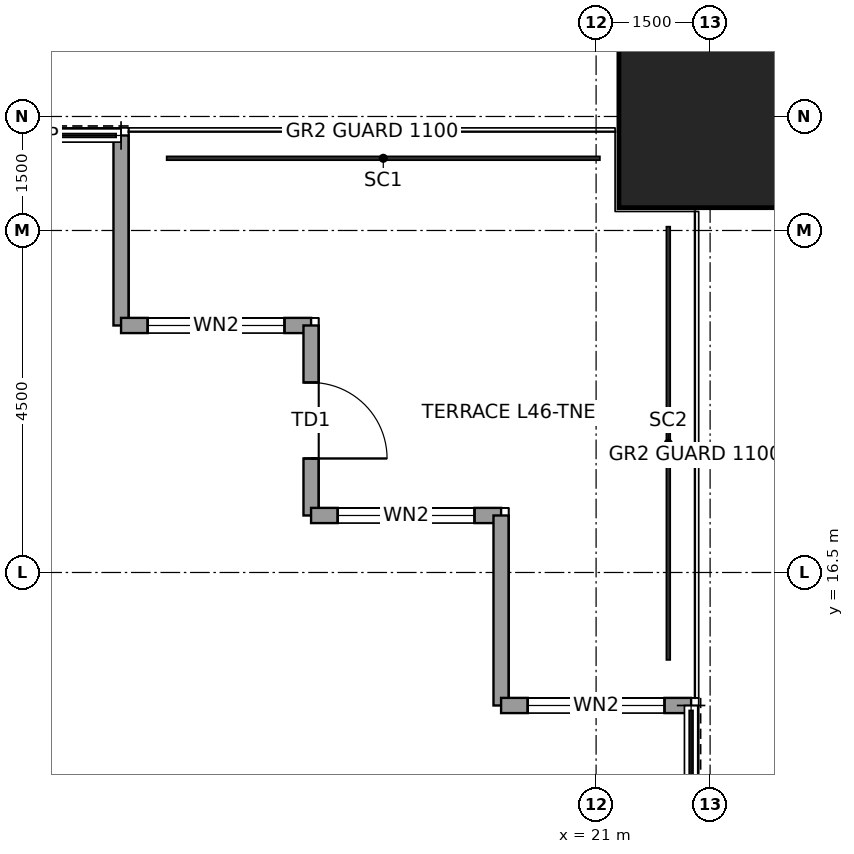
"""IFC4 building model, lengths in metres.
Left out: names, types, materials, properties, quantities, classifications, styles, units other than length and angle.
Written with IfcOpenShell. Run it as: python <this file> out.ifc"""

import sys

from ifc_helpers import new_model, si_unit, direction, frame, frame_2d, origin, origin_2d, place, context, subcontext, project, spatial, rectangle, hollow_rectangle, extrude, element, fill, save


model = new_model("IFC4")
c1 = context("Model", 3, precision=1e-05, world=origin(), true_north=direction((0.0, 1.0)))
c2 = subcontext(c1, "Body", "Model", "MODEL_VIEW")
j1 = project(units=[si_unit("LENGTHUNIT", "METRE"), si_unit("PLANEANGLEUNIT", "RADIAN")], contexts=[c1])
p1 = place(None, origin())
s1 = spatial("IfcSite", under=j1, at=p1, CompositionType="ELEMENT")
p2 = place(p1, origin())
s2 = spatial("IfcBuilding", under=s1, at=p2, CompositionType="ELEMENT")
p3 = place(p2, frame((0.0, 0.0, 217.9)))
s3 = spatial("IfcBuildingStorey", under=s2, at=p3, CompositionType="ELEMENT", Elevation=217.9)
p4 = place(p3, frame((22.5, 22.5, 0.0), z_axis=(0.0, 0.0, 1.0), x_axis=(1.0, 0.0, 0.0)))
e1 = element("IfcColumn", 1, at=p4, inside=s3, PredefinedType="COLUMN", context=c2, shape_type="SweptSolid", body=[
    extrude(hollow_rectangle(XDim=2.4, YDim=2.4, WallThickness=0.12, at=origin_2d()), origin(), (0.0, 0.0, 1.0), 4.0),
])
p5 = place(p3, frame((14.75, 22.25, 0.0), z_axis=(0.0, 0.0, 1.0), x_axis=(0.0, -1.0, 0.0)))
e2 = element("IfcWall", 2, at=p5, inside=s3, PredefinedType="SOLIDWALL", context=c2, shape_type="SweptSolid", body=[
    extrude(rectangle(XDim=2.5, YDim=0.2, at=frame_2d((1.25, 0.0))), origin(), (0.0, 0.0, 1.0), 3.85),
])
p6 = place(p3, frame((14.75, 19.75, 0.0), z_axis=(0.0, 0.0, 1.0), x_axis=(1.0, 0.0, 0.0)))
e3 = element("IfcWall", 3, at=p6, inside=s3, PredefinedType="SOLIDWALL", context=c2, shape_type="SweptSolid", body=[
    extrude(rectangle(XDim=2.5, YDim=0.2, at=frame_2d((1.25, 0.0))), origin(), (0.0, 0.0, 1.0), 3.85),
])
p7 = place(p6, frame((0.35, 0.0, 0.3)))
e4 = element("IfcOpeningElement", 4, at=p7, cuts=e3, PredefinedType="OPENING", context=c2, shape_type="SweptSolid", body=[
    extrude(rectangle(XDim=1.8, YDim=2.4, at=frame_2d((0.9, 1.2))), frame((0.0, 0.11, 0.0), z_axis=(0.0, -1.0, 0.0), x_axis=(1.0, 0.0, 0.0)), (0.0, 0.0, 1.0), 0.22),
])
p8 = place(p3, frame((17.25, 19.75, 0.0), z_axis=(0.0, 0.0, 1.0), x_axis=(0.0, -1.0, 0.0)))
e5 = element("IfcWall", 5, at=p8, inside=s3, PredefinedType="SOLIDWALL", context=c2, shape_type="SweptSolid", body=[
    extrude(rectangle(XDim=2.5, YDim=0.2, at=frame_2d((1.25, 0.0))), origin(), (0.0, 0.0, 1.0), 3.85),
])
p9 = place(p8, frame((0.75, 0.0, 0.0)))
e6 = element("IfcOpeningElement", 6, at=p9, cuts=e5, PredefinedType="OPENING", context=c2, shape_type="SweptSolid", body=[
    extrude(rectangle(XDim=1.0, YDim=2.4, at=frame_2d((0.5, 1.2))), frame((0.0, 0.11, 0.0), z_axis=(0.0, -1.0, 0.0), x_axis=(1.0, 0.0, 0.0)), (0.0, 0.0, 1.0), 0.22),
])
p10 = place(p3, frame((17.25, 17.25, 0.0), z_axis=(0.0, 0.0, 1.0), x_axis=(1.0, 0.0, 0.0)))
e7 = element("IfcWall", 7, at=p10, inside=s3, PredefinedType="SOLIDWALL", context=c2, shape_type="SweptSolid", body=[
    extrude(rectangle(XDim=2.5, YDim=0.2, at=frame_2d((1.25, 0.0))), origin(), (0.0, 0.0, 1.0), 3.85),
])
p11 = place(p10, frame((0.35, 0.0, 0.3)))
e8 = element("IfcOpeningElement", 8, at=p11, cuts=e7, PredefinedType="OPENING", context=c2, shape_type="SweptSolid", body=[
    extrude(rectangle(XDim=1.8, YDim=2.4, at=frame_2d((0.9, 1.2))), frame((0.0, 0.11, 0.0), z_axis=(0.0, -1.0, 0.0), x_axis=(1.0, 0.0, 0.0)), (0.0, 0.0, 1.0), 0.22),
])
p12 = place(p3, frame((19.75, 17.25, 0.0), z_axis=(0.0, 0.0, 1.0), x_axis=(0.0, -1.0, 0.0)))
e9 = element("IfcWall", 9, at=p12, inside=s3, PredefinedType="SOLIDWALL", context=c2, shape_type="SweptSolid", body=[
    extrude(rectangle(XDim=2.5, YDim=0.2, at=frame_2d((1.25, 0.0))), origin(), (0.0, 0.0, 1.0), 3.85),
])
p13 = place(p3, frame((19.75, 14.75, 0.0), z_axis=(0.0, 0.0, 1.0), x_axis=(1.0, 0.0, 0.0)))
e10 = element("IfcWall", 10, at=p13, inside=s3, PredefinedType="SOLIDWALL", context=c2, shape_type="SweptSolid", body=[
    extrude(rectangle(XDim=2.5, YDim=0.2, at=frame_2d((1.25, 0.0))), origin(), (0.0, 0.0, 1.0), 3.85),
])
p14 = place(p13, frame((0.35, 0.0, 0.3)))
e11 = element("IfcOpeningElement", 11, at=p14, cuts=e10, PredefinedType="OPENING", context=c2, shape_type="SweptSolid", body=[
    extrude(rectangle(XDim=1.8, YDim=2.4, at=frame_2d((0.9, 1.2))), frame((0.0, 0.11, 0.0), z_axis=(0.0, -1.0, 0.0), x_axis=(1.0, 0.0, 0.0)), (0.0, 0.0, 1.0), 0.22),
])
p15 = place(p7, origin())
e12 = element("IfcWindow", 12, at=p15, inside=s3, PartitioningType="SINGLE_PANEL", PredefinedType="WINDOW", context=c2, shape_type="SweptSolid", body=[
    extrude(rectangle(XDim=1.8, YDim=2.4, at=frame_2d((0.9, 1.2))), frame((0.0, 0.03, 0.0), z_axis=(0.0, -1.0, 0.0), x_axis=(1.0, 0.0, 0.0)), (0.0, 0.0, 1.0), 0.06),
])
fill(e4, e12)
p16 = place(p9, origin())
e13 = element("IfcDoor", 13, at=p16, inside=s3, OperationType="SINGLE_SWING_RIGHT", PredefinedType="DOOR", context=c2, shape_type="SweptSolid", body=[
    extrude(rectangle(XDim=1.0, YDim=2.4, at=frame_2d((0.5, 1.2))), frame((0.0, 0.025, 0.0), z_axis=(0.0, -1.0, 0.0), x_axis=(1.0, 0.0, 0.0)), (0.0, 0.0, 1.0), 0.05),
])
fill(e6, e13)
p17 = place(p11, origin())
e14 = element("IfcWindow", 14, at=p17, inside=s3, PartitioningType="SINGLE_PANEL", PredefinedType="WINDOW", context=c2, shape_type="SweptSolid", body=[
    extrude(rectangle(XDim=1.8, YDim=2.4, at=frame_2d((0.9, 1.2))), frame((0.0, 0.03, 0.0), z_axis=(0.0, -1.0, 0.0), x_axis=(1.0, 0.0, 0.0)), (0.0, 0.0, 1.0), 0.06),
])
fill(e8, e14)
p18 = place(p14, origin())
e15 = element("IfcWindow", 15, at=p18, inside=s3, PartitioningType="SINGLE_PANEL", PredefinedType="WINDOW", context=c2, shape_type="SweptSolid", body=[
    extrude(rectangle(XDim=1.8, YDim=2.4, at=frame_2d((0.9, 1.2))), frame((0.0, 0.03, 0.0), z_axis=(0.0, -1.0, 0.0), x_axis=(1.0, 0.0, 0.0)), (0.0, 0.0, 1.0), 0.06),
])
fill(e11, e15)
save(model, sys.argv[1])
